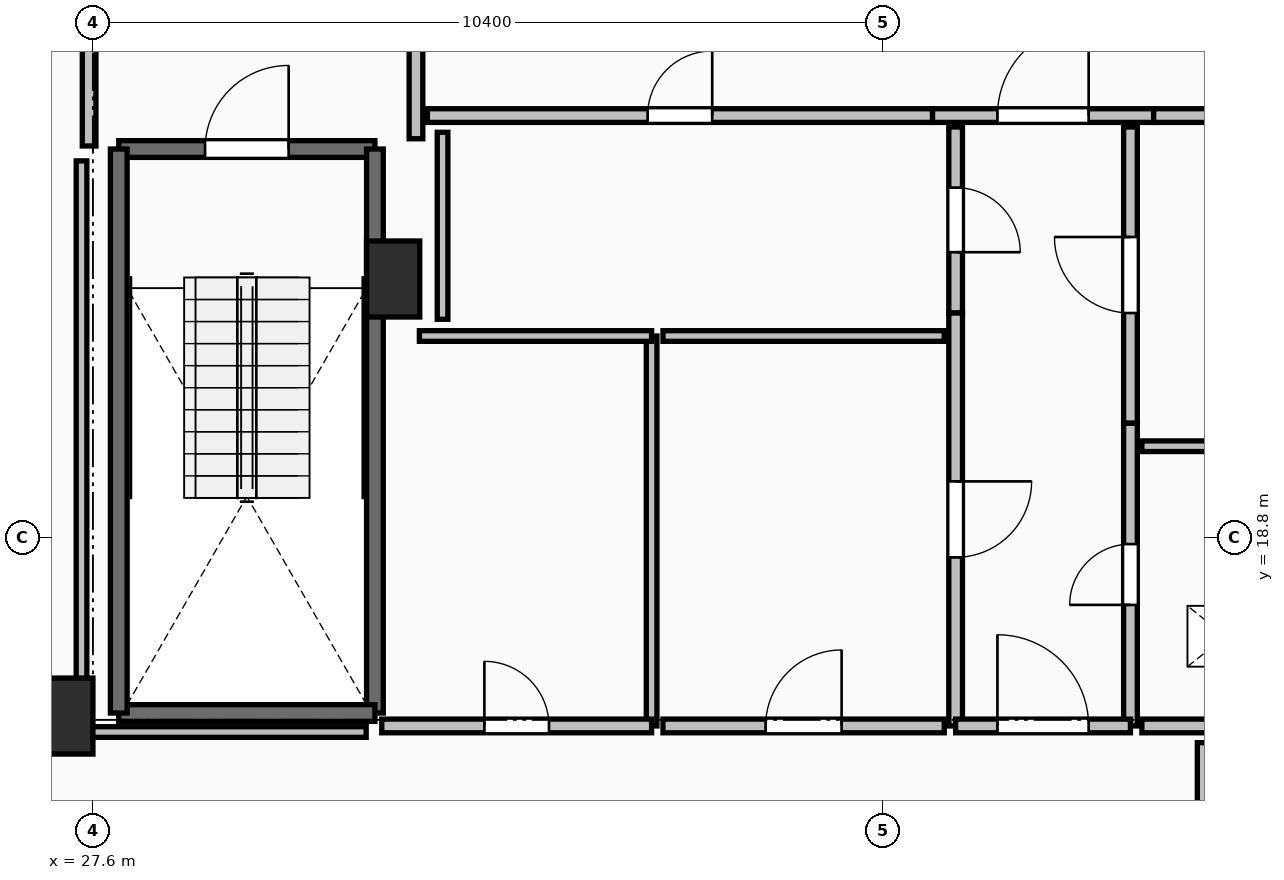
"""IFC4 building model, lengths in metres.
Left out: names, types, materials, properties, quantities, classifications, styles, units other than length and angle.
Written with IfcOpenShell. Run it as: python <this file> out.ifc"""

import sys

from ifc_helpers import new_model, si_unit, direction, frame, frame_2d, origin, origin_2d, place, context, subcontext, project, spatial, rectangle, extrude, element, fill, save


model = new_model("IFC4")
c1 = context("Model", 3, precision=1e-05, world=origin(), true_north=direction((0.0, 1.0)))
c2 = subcontext(c1, "Body", "Model", "MODEL_VIEW")
j1 = project(units=[si_unit("LENGTHUNIT", "METRE"), si_unit("PLANEANGLEUNIT", "RADIAN")], contexts=[c1])
p1 = place(None, origin())
s1 = spatial("IfcSite", under=j1, at=p1, CompositionType="ELEMENT")
p2 = place(p1, origin())
s2 = spatial("IfcBuilding", under=s1, at=p2, CompositionType="ELEMENT")
p3 = place(p2, frame((0.0, 0.0, 244.9)))
s3 = spatial("IfcBuildingStorey", under=s2, at=p3, CompositionType="ELEMENT", Elevation=244.9)
for number, where, z_axis, x_axis in (
    (1, (27.25, 16.45, 0.0), (0.0, 0.0, 1.0), (1.0, 0.0, 0.0)),
    (2, (31.55, 22.2, 0.0), (0.0, 0.0, 1.0), (1.0, 0.0, 0.0)),
):
    element("IfcColumn", number, at=place(p3, frame(where, z_axis=z_axis, x_axis=x_axis)), inside=s3, PredefinedType="PILASTER", context=c2, shape_type="SweptSolid", body=[
        extrude(rectangle(XDim=0.7, YDim=1.0, at=origin_2d()), origin(), (0.0, 0.0, 1.0), 3.55),
    ])
p4 = place(p3, frame((27.94, 23.91, 0.0), z_axis=(0.0, 0.0, 1.0), x_axis=(1.0, 0.0, 0.0)))
e3 = element("IfcWall", 3, at=p4, inside=s3, PredefinedType="SOLIDWALL", context=c2, shape_type="SweptSolid", body=[
    extrude(rectangle(XDim=3.37, YDim=0.22, at=frame_2d((1.685, 0.0))), origin(), (0.0, 0.0, 1.0), 3.29),
])
p5 = place(p4, frame((1.135, 0.0, 0.0)))
e4 = element("IfcOpeningElement", 4, at=p5, cuts=e3, PredefinedType="OPENING", context=c2, shape_type="SweptSolid", body=[
    extrude(rectangle(XDim=1.1, YDim=2.15, at=frame_2d((0.55, 1.075))), frame((0.0, 0.125, 0.0), z_axis=(0.0, -1.0, 0.0), x_axis=(1.0, 0.0, 0.0)), (0.0, 0.0, 1.0), 0.25),
])
p6 = place(p3, frame((31.31, 23.91, 0.0), z_axis=(0.0, 0.0, 1.0), x_axis=(0.0, -1.0, 0.0)))
e5 = element("IfcWall", 5, at=p6, inside=s3, PredefinedType="SOLIDWALL", context=c2, shape_type="SweptSolid", body=[
    extrude(rectangle(XDim=7.42, YDim=0.22, at=frame_2d((3.71, 0.0))), origin(), (0.0, 0.0, 1.0), 3.29),
])
p7 = place(p3, frame((31.31, 16.49, 0.0), z_axis=(0.0, 0.0, 1.0), x_axis=(-1.0, 0.0, 0.0)))
e6 = element("IfcWall", 6, at=p7, inside=s3, PredefinedType="SOLIDWALL", context=c2, shape_type="SweptSolid", body=[
    extrude(rectangle(XDim=3.37, YDim=0.22, at=frame_2d((1.685, 0.0))), origin(), (0.0, 0.0, 1.0), 3.29),
])
p8 = place(p3, frame((27.94, 16.49, 0.0), z_axis=(0.0, 0.0, 1.0), x_axis=(0.0, 1.0, 0.0)))
e7 = element("IfcWall", 7, at=p8, inside=s3, PredefinedType="SOLIDWALL", context=c2, shape_type="SweptSolid", body=[
    extrude(rectangle(XDim=7.42, YDim=0.22, at=frame_2d((3.71, 0.0))), origin(), (0.0, 0.0, 1.0), 3.29),
])
p9 = place(p3, frame((31.85, 24.045, 0.0), z_axis=(0.0, 0.0, 1.0), x_axis=(0.0, 1.0, 0.0)))
e8 = element("IfcWall", 8, at=p9, inside=s3, PredefinedType="PARTITIONING", context=c2, shape_type="SweptSolid", body=[
    extrude(rectangle(XDim=3.91, YDim=0.18, at=frame_2d((1.955, 0.0))), origin(), (0.0, 0.0, 1.0), 3.29),
])
p10 = place(p9, frame((1.355, 0.0, 0.0)))
e9 = element("IfcOpeningElement", 9, at=p10, cuts=e8, PredefinedType="OPENING", context=c2, shape_type="SweptSolid", body=[
    extrude(rectangle(XDim=1.2, YDim=2.15, at=frame_2d((0.6, 1.075))), frame((0.0, 0.105, 0.0), z_axis=(0.0, -1.0, 0.0), x_axis=(1.0, 0.0, 0.0)), (0.0, 0.0, 1.0), 0.21),
])
p11 = place(p3, frame((27.55, 28.0, 0.0), z_axis=(0.0, 0.0, 1.0), x_axis=(0.0, -1.0, 0.0)))
e10 = element("IfcWall", 10, at=p11, inside=s3, PredefinedType="PARTITIONING", context=c2, shape_type="SweptSolid", body=[
    extrude(rectangle(XDim=4.05, YDim=0.18, at=frame_2d((2.025, 0.0))), origin(), (0.0, 0.0, 1.0), 3.29),
])
p12 = place(p11, frame((1.425, 0.0, 0.0)))
e11 = element("IfcOpeningElement", 11, at=p12, cuts=e10, PredefinedType="OPENING", context=c2, shape_type="SweptSolid", body=[
    extrude(rectangle(XDim=1.2, YDim=2.15, at=frame_2d((0.6, 1.075))), frame((0.0, 0.105, 0.0), z_axis=(0.0, -1.0, 0.0), x_axis=(1.0, 0.0, 0.0)), (0.0, 0.0, 1.0), 0.21),
])
p13 = place(p3, frame((38.645, 24.35, 0.0), z_axis=(0.0, 0.0, 1.0), x_axis=(1.0, 0.0, 0.0)))
e12 = element("IfcWall", 12, at=p13, inside=s3, PredefinedType="PARTITIONING", context=c2, shape_type="SweptSolid", body=[
    extrude(rectangle(XDim=2.91, YDim=0.18, at=frame_2d((1.455, 0.0))), origin(), (0.0, 0.0, 1.0), 3.29),
])
p14 = place(p13, frame((0.855, 0.0, 0.0)))
e13 = element("IfcOpeningElement", 13, at=p14, cuts=e12, PredefinedType="OPENING", context=c2, shape_type="SweptSolid", body=[
    extrude(rectangle(XDim=1.2, YDim=2.15, at=frame_2d((0.6, 1.075))), frame((0.0, 0.105, 0.0), z_axis=(0.0, -1.0, 0.0), x_axis=(1.0, 0.0, 0.0)), (0.0, 0.0, 1.0), 0.21),
])
p15 = place(p3, frame((41.555, 24.35, 0.0), z_axis=(0.0, 0.0, 1.0), x_axis=(1.0, 0.0, 0.0)))
e14 = element("IfcWall", 14, at=p15, inside=s3, PredefinedType="PARTITIONING", context=c2, shape_type="SweptSolid", body=[
    extrude(rectangle(XDim=2.445, YDim=0.18, at=frame_2d((1.223, 0.0))), origin(), (0.0, 0.0, 1.0), 3.29),
])
p16 = place(p15, frame((0.722, 0.0, 0.0)))
e15 = element("IfcOpeningElement", 15, at=p16, cuts=e14, PredefinedType="OPENING", context=c2, shape_type="SweptSolid", body=[
    extrude(rectangle(XDim=1.0, YDim=2.15, at=frame_2d((0.5, 1.075))), frame((0.0, 0.105, 0.0), z_axis=(0.0, -1.0, 0.0), x_axis=(1.0, 0.0, 0.0)), (0.0, 0.0, 1.0), 0.21),
])
p17 = place(p3, frame((32.0, 24.35, 0.0), z_axis=(0.0, 0.0, 1.0), x_axis=(1.0, 0.0, 0.0)))
e16 = element("IfcWall", 16, at=p17, inside=s3, PredefinedType="PARTITIONING", context=c2, shape_type="SweptSolid", body=[
    extrude(rectangle(XDim=6.645, YDim=0.18, at=frame_2d((3.323, 0.0))), origin(), (0.0, 0.0, 1.0), 3.29),
])
p18 = place(p17, frame((2.897, 0.0, 0.0)))
e17 = element("IfcOpeningElement", 17, at=p18, cuts=e16, PredefinedType="OPENING", context=c2, shape_type="SweptSolid", body=[
    extrude(rectangle(XDim=0.85, YDim=2.1, at=frame_2d((0.425, 1.05))), frame((0.0, 0.105, 0.0), z_axis=(0.0, -1.0, 0.0), x_axis=(1.0, 0.0, 0.0)), (0.0, 0.0, 1.0), 0.21),
])
p19 = place(p3, frame((41.25, 16.32, 0.0), z_axis=(0.0, 0.0, 1.0), x_axis=(0.0, 1.0, 0.0)))
e18 = element("IfcWall", 18, at=p19, inside=s3, PredefinedType="PARTITIONING", context=c2, shape_type="SweptSolid", body=[
    extrude(rectangle(XDim=3.985, YDim=0.18, at=frame_2d((1.992, 0.0))), origin(), (0.0, 0.0, 1.0), 3.29),
])
p20 = place(p19, frame((1.593, 0.0, 0.0)))
e19 = element("IfcOpeningElement", 19, at=p20, cuts=e18, PredefinedType="OPENING", context=c2, shape_type="SweptSolid", body=[
    extrude(rectangle(XDim=0.8, YDim=2.05, at=frame_2d((0.4, 1.025))), frame((0.0, 0.105, 0.0), z_axis=(0.0, -1.0, 0.0), x_axis=(1.0, 0.0, 0.0)), (0.0, 0.0, 1.0), 0.21),
])
p21 = place(p3, frame((41.25, 20.305, 0.0), z_axis=(0.0, 0.0, 1.0), x_axis=(0.0, 1.0, 0.0)))
e20 = element("IfcWall", 20, at=p21, inside=s3, PredefinedType="PARTITIONING", context=c2, shape_type="SweptSolid", body=[
    extrude(rectangle(XDim=3.895, YDim=0.18, at=frame_2d((1.948, 0.0))), origin(), (0.0, 0.0, 1.0), 2.482),
])
p22 = place(p21, frame((1.448, 0.0, 0.0)))
e21 = element("IfcOpeningElement", 21, at=p22, cuts=e20, PredefinedType="OPENING", context=c2, shape_type="SweptSolid", body=[
    extrude(rectangle(XDim=1.0, YDim=2.15, at=frame_2d((0.5, 1.075))), frame((0.0, 0.105, 0.0), z_axis=(0.0, -1.0, 0.0), x_axis=(1.0, 0.0, 0.0)), (0.0, 0.0, 1.0), 0.21),
])
p23 = place(p3, frame((38.95, 21.755, 0.0), z_axis=(0.0, 0.0, 1.0), x_axis=(0.0, -1.0, 0.0)))
e22 = element("IfcWall", 22, at=p23, inside=s3, PredefinedType="PARTITIONING", context=c2, shape_type="SweptSolid", body=[
    extrude(rectangle(XDim=5.435, YDim=0.18, at=frame_2d((2.717, 0.0))), origin(), (0.0, 0.0, 1.0), 3.29),
])
p24 = place(p23, frame((2.218, 0.0, 0.0)))
e23 = element("IfcOpeningElement", 23, at=p24, cuts=e22, PredefinedType="OPENING", context=c2, shape_type="SweptSolid", body=[
    extrude(rectangle(XDim=1.0, YDim=2.15, at=frame_2d((0.5, 1.075))), frame((0.0, 0.105, 0.0), z_axis=(0.0, -1.0, 0.0), x_axis=(1.0, 0.0, 0.0)), (0.0, 0.0, 1.0), 0.21),
])
p25 = place(p3, frame((38.95, 24.2, 0.0), z_axis=(0.0, 0.0, 1.0), x_axis=(0.0, -1.0, 0.0)))
e24 = element("IfcWall", 24, at=p25, inside=s3, PredefinedType="PARTITIONING", context=c2, shape_type="SweptSolid", body=[
    extrude(rectangle(XDim=2.445, YDim=0.18, at=frame_2d((1.223, 0.0))), origin(), (0.0, 0.0, 1.0), 2.482),
])
p26 = place(p25, frame((0.798, 0.0, 0.0)))
e25 = element("IfcOpeningElement", 25, at=p26, cuts=e24, PredefinedType="OPENING", context=c2, shape_type="SweptSolid", body=[
    extrude(rectangle(XDim=0.85, YDim=2.1, at=frame_2d((0.425, 1.05))), frame((0.0, 0.105, 0.0), z_axis=(0.0, -1.0, 0.0), x_axis=(1.0, 0.0, 0.0)), (0.0, 0.0, 1.0), 0.21),
])
p27 = place(p3, frame((38.95, 16.32, 0.0), z_axis=(0.0, 0.0, 1.0), x_axis=(1.0, 0.0, 0.0)))
e26 = element("IfcWall", 26, at=p27, inside=s3, PredefinedType="PARTITIONING", context=c2, shape_type="SweptSolid", body=[
    extrude(rectangle(XDim=2.3, YDim=0.18, at=frame_2d((1.15, 0.0))), origin(), (0.0, 0.0, 1.0), 3.29),
])
p28 = place(p27, frame((0.55, 0.0, 0.0)))
e27 = element("IfcOpeningElement", 27, at=p28, cuts=e26, PredefinedType="OPENING", context=c2, shape_type="SweptSolid", body=[
    extrude(rectangle(XDim=1.2, YDim=2.15, at=frame_2d((0.6, 1.075))), frame((0.0, 0.105, 0.0), z_axis=(0.0, -1.0, 0.0), x_axis=(1.0, 0.0, 0.0)), (0.0, 0.0, 1.0), 0.21),
])
p29 = place(p3, frame((44.6, 20.0, 0.0), z_axis=(0.0, 0.0, 1.0), x_axis=(-1.0, 0.0, 0.0)))
e28 = element("IfcWall", 28, at=p29, inside=s3, PredefinedType="PARTITIONING", context=c2, shape_type="SweptSolid", body=[
    extrude(rectangle(XDim=3.2, YDim=0.14, at=frame_2d((1.6, 0.0))), origin(), (0.0, 0.0, 1.0), 3.29),
])
p30 = place(p3, frame((41.4, 16.32, 0.0), z_axis=(0.0, 0.0, 1.0), x_axis=(1.0, 0.0, 0.0)))
e29 = element("IfcWall", 29, at=p30, inside=s3, PredefinedType="PARTITIONING", context=c2, shape_type="SweptSolid", body=[
    extrude(rectangle(XDim=3.2, YDim=0.18, at=frame_2d((1.6, 0.0))), origin(), (0.0, 0.0, 1.0), 3.29),
])
p31 = place(p30, frame((1.2, 0.0, 0.0)))
e30 = element("IfcOpeningElement", 30, at=p31, cuts=e29, PredefinedType="OPENING", context=c2, shape_type="SweptSolid", body=[
    extrude(rectangle(XDim=0.8, YDim=2.05, at=frame_2d((0.4, 1.025))), frame((0.0, 0.105, 0.0), z_axis=(0.0, -1.0, 0.0), x_axis=(1.0, 0.0, 0.0)), (0.0, 0.0, 1.0), 0.21),
])
p32 = place(p3, frame((34.95, 16.32, 0.0), z_axis=(0.0, 0.0, 1.0), x_axis=(0.0, 1.0, 0.0)))
e31 = element("IfcWall", 31, at=p32, inside=s3, PredefinedType="PARTITIONING", context=c2, shape_type="SweptSolid", body=[
    extrude(rectangle(XDim=5.13, YDim=0.14, at=frame_2d((2.565, 0.0))), origin(), (0.0, 0.0, 1.0), 3.29),
])
p33 = place(p3, frame((34.95, 21.45, 0.0), z_axis=(0.0, 0.0, 1.0), x_axis=(-1.0, 0.0, 0.0)))
e32 = element("IfcWall", 32, at=p33, inside=s3, PredefinedType="PARTITIONING", context=c2, shape_type="SweptSolid", body=[
    extrude(rectangle(XDim=3.055, YDim=0.14, at=frame_2d((1.527, 0.0))), origin(), (0.0, 0.0, 1.0), 3.29),
])
p34 = place(p3, frame((31.4, 16.32, 0.0), z_axis=(0.0, 0.0, 1.0), x_axis=(1.0, 0.0, 0.0)))
e33 = element("IfcWall", 33, at=p34, inside=s3, PredefinedType="PARTITIONING", context=c2, shape_type="SweptSolid", body=[
    extrude(rectangle(XDim=3.55, YDim=0.18, at=frame_2d((1.775, 0.0))), origin(), (0.0, 0.0, 1.0), 3.29),
])
p35 = place(p34, frame((1.35, 0.0, 0.0)))
e34 = element("IfcOpeningElement", 34, at=p35, cuts=e33, PredefinedType="OPENING", context=c2, shape_type="SweptSolid", body=[
    extrude(rectangle(XDim=0.85, YDim=2.1, at=frame_2d((0.425, 1.05))), frame((0.0, 0.105, 0.0), z_axis=(0.0, -1.0, 0.0), x_axis=(1.0, 0.0, 0.0)), (0.0, 0.0, 1.0), 0.21),
])
p36 = place(p3, frame((38.8, 21.45, 0.0), z_axis=(0.0, 0.0, 1.0), x_axis=(-1.0, 0.0, 0.0)))
e35 = element("IfcWall", 35, at=p36, inside=s3, PredefinedType="PARTITIONING", context=c2, shape_type="SweptSolid", body=[
    extrude(rectangle(XDim=3.7, YDim=0.14, at=frame_2d((1.85, 0.0))), origin(), (0.0, 0.0, 1.0), 3.29),
])
p37 = place(p3, frame((35.1, 16.32, 0.0), z_axis=(0.0, 0.0, 1.0), x_axis=(1.0, 0.0, 0.0)))
e36 = element("IfcWall", 36, at=p37, inside=s3, PredefinedType="PARTITIONING", context=c2, shape_type="SweptSolid", body=[
    extrude(rectangle(XDim=3.7, YDim=0.18, at=frame_2d((1.85, 0.0))), origin(), (0.0, 0.0, 1.0), 3.29),
])
p38 = place(p37, frame((1.35, 0.0, 0.0)))
e37 = element("IfcOpeningElement", 37, at=p38, cuts=e36, PredefinedType="OPENING", context=c2, shape_type="SweptSolid", body=[
    extrude(rectangle(XDim=1.0, YDim=2.15, at=frame_2d((0.5, 1.075))), frame((0.0, 0.105, 0.0), z_axis=(0.0, -1.0, 0.0), x_axis=(1.0, 0.0, 0.0)), (0.0, 0.0, 1.0), 0.21),
])
p39 = place(p3, frame((32.2, 24.13, 0.0), z_axis=(0.0, 0.0, 1.0), x_axis=(0.0, -1.0, 0.0)))
e38 = element("IfcWall", 38, at=p39, inside=s3, PredefinedType="PARTITIONING", context=c2, shape_type="SweptSolid", body=[
    extrude(rectangle(XDim=2.46, YDim=0.14, at=frame_2d((1.23, 0.0))), origin(), (0.0, 0.0, 1.0), 2.482),
])
p40 = place(p3, frame((27.45, 23.754, 0.0), z_axis=(0.0, 0.0, 1.0), x_axis=(0.0, -1.0, 0.0)))
e39 = element("IfcWall", 39, at=p40, inside=s3, PredefinedType="PARTITIONING", context=c2, shape_type="SweptSolid", body=[
    extrude(rectangle(XDim=7.514, YDim=0.14, at=frame_2d((3.757, 0.0))), origin(), (0.0, 0.0, 1.0), 2.482),
])
p41 = place(p3, frame((27.45, 16.24, 0.0), z_axis=(0.0, 0.0, 1.0), x_axis=(1.0, 0.0, 0.0)))
e40 = element("IfcWall", 40, at=p41, inside=s3, PredefinedType="PARTITIONING", context=c2, shape_type="SweptSolid", body=[
    extrude(rectangle(XDim=3.745, YDim=0.14, at=frame_2d((1.873, 0.0))), origin(), (0.0, 0.0, 1.0), 2.482),
])
p42 = place(p3, frame((42.2, 16.1, 0.0), z_axis=(0.0, 0.0, 1.0), x_axis=(0.0, -1.0, 0.0)))
e41 = element("IfcWall", 41, at=p42, inside=s3, PredefinedType="PARTITIONING", context=c2, shape_type="SweptSolid", body=[
    extrude(rectangle(XDim=1.83, YDim=0.14, at=frame_2d((0.915, 0.0))), origin(), (0.0, 0.0, 1.0), 3.022),
])
p43 = place(p5, origin())
e42 = element("IfcDoor", 42, at=p43, inside=s3, OperationType="SINGLE_SWING_RIGHT", PredefinedType="DOOR", context=c2, shape_type="SweptSolid", body=[
    extrude(rectangle(XDim=1.1, YDim=2.15, at=frame_2d((0.55, 1.075))), frame((0.0, 0.025, 0.0), z_axis=(0.0, -1.0, 0.0), x_axis=(1.0, 0.0, 0.0)), (0.0, 0.0, 1.0), 0.05),
])
fill(e4, e42)
p44 = place(p14, origin())
e43 = element("IfcDoor", 43, at=p44, inside=s3, OperationType="SINGLE_SWING_RIGHT", PredefinedType="DOOR", context=c2, shape_type="SweptSolid", body=[
    extrude(rectangle(XDim=1.2, YDim=2.15, at=frame_2d((0.6, 1.075))), frame((0.0, 0.025, 0.0), z_axis=(0.0, -1.0, 0.0), x_axis=(1.0, 0.0, 0.0)), (0.0, 0.0, 1.0), 0.05),
])
fill(e13, e43)
p45 = place(p18, origin())
e44 = element("IfcDoor", 44, at=p45, inside=s3, OperationType="SINGLE_SWING_RIGHT", PredefinedType="DOOR", context=c2, shape_type="SweptSolid", body=[
    extrude(rectangle(XDim=0.85, YDim=2.1, at=frame_2d((0.425, 1.05))), frame((0.0, 0.025, 0.0), z_axis=(0.0, -1.0, 0.0), x_axis=(1.0, 0.0, 0.0)), (0.0, 0.0, 1.0), 0.05),
])
fill(e17, e44)
p46 = place(p20, origin())
e45 = element("IfcDoor", 45, at=p46, inside=s3, OperationType="SINGLE_SWING_LEFT", PredefinedType="DOOR", context=c2, shape_type="SweptSolid", body=[
    extrude(rectangle(XDim=0.8, YDim=2.05, at=frame_2d((0.4, 1.025))), frame((0.0, 0.025, 0.0), z_axis=(0.0, -1.0, 0.0), x_axis=(1.0, 0.0, 0.0)), (0.0, 0.0, 1.0), 0.05),
])
fill(e19, e45)
p47 = place(p22, origin())
e46 = element("IfcDoor", 46, at=p47, inside=s3, OperationType="SINGLE_SWING_RIGHT", PredefinedType="DOOR", context=c2, shape_type="SweptSolid", body=[
    extrude(rectangle(XDim=1.0, YDim=2.15, at=frame_2d((0.5, 1.075))), frame((0.0, 0.025, 0.0), z_axis=(0.0, -1.0, 0.0), x_axis=(1.0, 0.0, 0.0)), (0.0, 0.0, 1.0), 0.05),
])
fill(e21, e46)
p48 = place(p24, origin())
e47 = element("IfcDoor", 47, at=p48, inside=s3, OperationType="SINGLE_SWING_LEFT", PredefinedType="DOOR", context=c2, shape_type="SweptSolid", body=[
    extrude(rectangle(XDim=1.0, YDim=2.15, at=frame_2d((0.5, 1.075))), frame((0.0, 0.025, 0.0), z_axis=(0.0, -1.0, 0.0), x_axis=(1.0, 0.0, 0.0)), (0.0, 0.0, 1.0), 0.05),
])
fill(e23, e47)
p49 = place(p26, origin())
e48 = element("IfcDoor", 48, at=p49, inside=s3, OperationType="SINGLE_SWING_RIGHT", PredefinedType="DOOR", context=c2, shape_type="SweptSolid", body=[
    extrude(rectangle(XDim=0.85, YDim=2.1, at=frame_2d((0.425, 1.05))), frame((0.0, 0.025, 0.0), z_axis=(0.0, -1.0, 0.0), x_axis=(1.0, 0.0, 0.0)), (0.0, 0.0, 1.0), 0.05),
])
fill(e25, e48)
p50 = place(p28, origin())
e49 = element("IfcDoor", 49, at=p50, inside=s3, OperationType="SINGLE_SWING_LEFT", PredefinedType="DOOR", context=c2, shape_type="SweptSolid", body=[
    extrude(rectangle(XDim=1.2, YDim=2.15, at=frame_2d((0.6, 1.075))), frame((0.0, 0.025, 0.0), z_axis=(0.0, -1.0, 0.0), x_axis=(1.0, 0.0, 0.0)), (0.0, 0.0, 1.0), 0.05),
])
fill(e27, e49)
p51 = place(p35, origin())
e50 = element("IfcDoor", 50, at=p51, inside=s3, OperationType="SINGLE_SWING_LEFT", PredefinedType="DOOR", context=c2, shape_type="SweptSolid", body=[
    extrude(rectangle(XDim=0.85, YDim=2.1, at=frame_2d((0.425, 1.05))), frame((0.0, 0.025, 0.0), z_axis=(0.0, -1.0, 0.0), x_axis=(1.0, 0.0, 0.0)), (0.0, 0.0, 1.0), 0.05),
])
fill(e34, e50)
p52 = place(p38, origin())
e51 = element("IfcDoor", 51, at=p52, inside=s3, OperationType="SINGLE_SWING_RIGHT", PredefinedType="DOOR", context=c2, shape_type="SweptSolid", body=[
    extrude(rectangle(XDim=1.0, YDim=2.15, at=frame_2d((0.5, 1.075))), frame((0.0, 0.025, 0.0), z_axis=(0.0, -1.0, 0.0), x_axis=(1.0, 0.0, 0.0)), (0.0, 0.0, 1.0), 0.05),
])
fill(e37, e51)
save(model, sys.argv[1])
